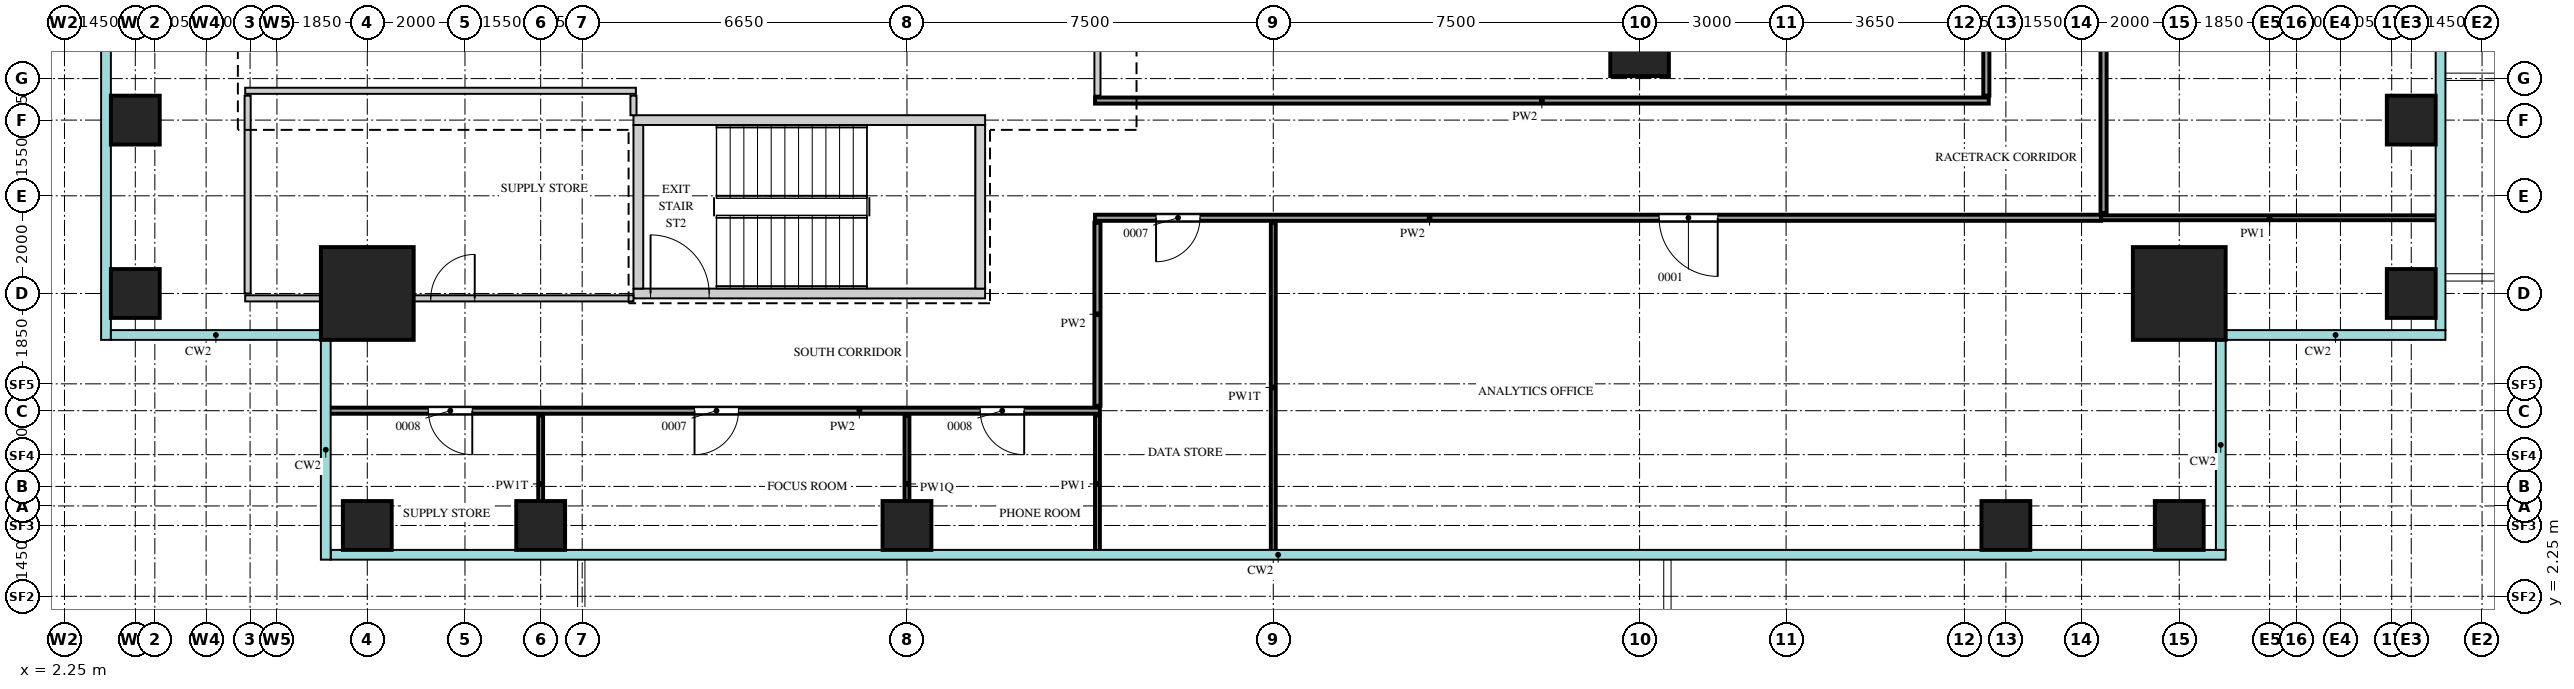
"""IFC4 building model, lengths in metres.
Left out: names, types, materials, properties, quantities, classifications, styles, units other than length and angle.
Written with IfcOpenShell. Run it as: python <this file> out.ifc"""

import sys

from ifc_helpers import new_model, si_unit, direction, frame, frame_2d, origin, origin_2d, place, context, subcontext, project, spatial, rectangle, extrude, source, transform, mapped, element, fill, save


model = new_model("IFC4")
c1 = context("Model", 3, precision=1e-05, world=origin(), true_north=direction((0.0, 1.0)))
c2 = subcontext(c1, "Body", "Model", "MODEL_VIEW")
j1 = project(units=[si_unit("LENGTHUNIT", "METRE"), si_unit("PLANEANGLEUNIT", "RADIAN")], contexts=[c1])
p1 = place(None, origin())
s1 = spatial("IfcSite", under=j1, at=p1, CompositionType="ELEMENT")
p2 = place(p1, origin())
s2 = spatial("IfcBuilding", under=s1, at=p2, CompositionType="ELEMENT")
p3 = place(p2, frame((0.0, 0.0, 208.7)))
s3 = spatial("IfcBuildingStorey", under=s2, at=p3, CompositionType="ELEMENT", Elevation=208.7)
m1 = source(origin(), c2, "Body", "SweptSolid", [
    extrude(rectangle(XDim=7.2, YDim=0.2, at=frame_2d((3.6, 0.0))), origin(), (0.0, 0.0, 1.0), 3.75),
])
p4 = place(p3, frame((13.9, 12.0, 0.0), z_axis=(0.0, 0.0, 1.0), x_axis=(1.0, 0.0, 0.0)))
e1 = element("IfcWall", 1, at=p4, inside=s3, PredefinedType="SHEAR", context=c2, shape_type="MappedRepresentation", body=[
    mapped(m1, transform((0.0, 0.0, 0.0))),
])
p5 = place(p3, frame((13.9, 8.45, 0.0), z_axis=(0.0, 0.0, 1.0), x_axis=(1.0, 0.0, 0.0)))
e2 = element("IfcWall", 2, at=p5, inside=s3, PredefinedType="SHEAR", context=c2, shape_type="MappedRepresentation", body=[
    mapped(m1, transform((0.0, 0.0, 0.0))),
])
m2 = source(origin(), c2, "Body", "SweptSolid", [
    extrude(rectangle(XDim=1.2, YDim=2.1, at=frame_2d((0.6, 1.05))), frame((0.0, 0.11, 0.0), z_axis=(0.0, -1.0, 0.0), x_axis=(1.0, 0.0, 0.0)), (0.0, 0.0, 1.0), 0.22),
])
p6 = place(p5, frame((0.35, 0.0, 0.0)))
e3 = element("IfcOpeningElement", 3, at=p6, cuts=e2, PredefinedType="OPENING", context=c2, shape_type="MappedRepresentation", body=[
    mapped(m2, transform((0.0, 0.0, 0.0))),
])
m3 = source(origin(), c2, "Body", "SweptSolid", [
    extrude(rectangle(XDim=3.35, YDim=0.2, at=frame_2d((1.675, 0.0))), origin(), (0.0, 0.0, 1.0), 3.75),
])
for number, where, z_axis, x_axis in (
    (4, (21.0, 8.55, 0.0), (0.0, 0.0, 1.0), (0.0, 1.0, 0.0)),
    (5, (14.0, 8.55, 0.0), (0.0, 0.0, 1.0), (0.0, 1.0, 0.0)),
):
    element("IfcWall", number, at=place(p3, frame(where, z_axis=z_axis, x_axis=x_axis)), inside=s3, PredefinedType="SHEAR", context=c2, shape_type="MappedRepresentation", body=[
        mapped(m3, transform((0.0, 0.0, 0.0))),
    ])
m4 = source(origin(), c2, "Body", "SweptSolid", [
    extrude(rectangle(XDim=1.9, YDim=1.9, at=origin_2d()), origin(), (0.0, 0.0, 1.0), 4.0),
])
for number, where, z_axis, x_axis in (
    (6, (45.55, 8.45, 0.0), (0.0, 0.0, 1.0), (1.0, 0.0, 0.0)),
    (7, (8.45, 8.45, 0.0), (0.0, 0.0, 1.0), (1.0, 0.0, 0.0)),
):
    element("IfcColumn", number, at=place(p3, frame(where, z_axis=z_axis, x_axis=x_axis)), inside=s3, PredefinedType="COLUMN", context=c2, shape_type="MappedRepresentation", body=[
        mapped(m4, transform((0.0, 0.0, 0.0))),
    ])
m5 = source(origin(), c2, "Body", "SweptSolid", [
    extrude(rectangle(XDim=1.0, YDim=1.0, at=origin_2d()), origin(), (0.0, 0.0, 1.0), 3.75),
])
for number, where, z_axis, x_axis in (
    (8, (8.45, 3.7, 0.0), (0.0, 0.0, 1.0), (1.0, 0.0, 0.0)),
    (9, (12.0, 3.7, 0.0), (0.0, 0.0, 1.0), (1.0, 0.0, 0.0)),
    (10, (19.5, 3.7, 0.0), (0.0, 0.0, 1.0), (1.0, 0.0, 0.0)),
    (11, (42.0, 3.7, 0.0), (0.0, 0.0, 1.0), (1.0, 0.0, 0.0)),
    (12, (45.55, 3.7, 0.0), (0.0, 0.0, 1.0), (1.0, 0.0, 0.0)),
    (13, (50.3, 8.45, 0.0), (0.0, 0.0, 1.0), (1.0, 0.0, 0.0)),
    (14, (50.3, 12.0, 0.0), (0.0, 0.0, 1.0), (1.0, 0.0, 0.0)),
    (15, (3.7, 8.45, 0.0), (0.0, 0.0, 1.0), (1.0, 0.0, 0.0)),
    (16, (3.7, 12.0, 0.0), (0.0, 0.0, 1.0), (1.0, 0.0, 0.0)),
):
    element("IfcColumn", number, at=place(p3, frame(where, z_axis=z_axis, x_axis=x_axis)), inside=s3, PredefinedType="COLUMN", context=c2, shape_type="MappedRepresentation", body=[
        mapped(m5, transform((0.0, 0.0, 0.0))),
    ])
m6 = source(origin(), c2, "Body", "SweptSolid", [
    extrude(rectangle(XDim=1.2, YDim=1.2, at=origin_2d()), origin(), (0.0, 0.0, 1.0), 3.75),
])
p7 = place(p3, frame((34.5, 13.5, 0.0), z_axis=(0.0, 0.0, 1.0), x_axis=(1.0, 0.0, 0.0)))
e17 = element("IfcColumn", 17, at=p7, inside=s3, PredefinedType="COLUMN", context=c2, shape_type="MappedRepresentation", body=[
    mapped(m6, transform((0.0, 0.0, 0.0))),
])
m7 = source(origin(), c2, "Body", "SweptSolid", [
    extrude(rectangle(XDim=2.8, YDim=0.1, at=frame_2d((1.4, 0.0))), origin(), (0.0, 0.0, 1.0), 3.3),
])
p8 = place(p3, frame((12.0, 3.15, 0.0), z_axis=(0.0, 0.0, 1.0), x_axis=(0.0, 1.0, 0.0)))
e18 = element("IfcWall", 18, at=p8, inside=s3, PredefinedType="PARTITIONING", context=c2, shape_type="MappedRepresentation", body=[
    mapped(m7, transform((0.0, 0.0, 0.0))),
])
m8 = source(origin(), c2, "Body", "SweptSolid", [
    extrude(rectangle(XDim=2.8, YDim=0.1, at=frame_2d((1.4, 0.0))), origin(), (0.0, 0.0, 1.0), 3.42),
])
p9 = place(p3, frame((19.5, 3.15, 0.0), z_axis=(0.0, 0.0, 1.0), x_axis=(0.0, 1.0, 0.0)))
e19 = element("IfcWall", 19, at=p9, inside=s3, PredefinedType="PARTITIONING", context=c2, shape_type="MappedRepresentation", body=[
    mapped(m8, transform((0.0, 0.0, 0.0))),
])
m9 = source(origin(), c2, "Body", "SweptSolid", [
    extrude(rectangle(XDim=2.8, YDim=0.1, at=frame_2d((1.4, 0.0))), origin(), (0.0, 0.0, 1.0), 3.8),
])
p10 = place(p3, frame((23.4, 3.15, 0.0), z_axis=(0.0, 0.0, 1.0), x_axis=(0.0, 1.0, 0.0)))
e20 = element("IfcWall", 20, at=p10, inside=s3, PredefinedType="PARTITIONING", context=c2, shape_type="MappedRepresentation", body=[
    mapped(m9, transform((0.0, 0.0, 0.0))),
])
m10 = source(origin(), c2, "Body", "SweptSolid", [
    extrude(rectangle(XDim=6.75, YDim=0.1, at=frame_2d((3.375, 0.0))), origin(), (0.0, 0.0, 1.0), 3.3),
])
p11 = place(p3, frame((27.0, 3.15, 0.0), z_axis=(0.0, 0.0, 1.0), x_axis=(0.0, 1.0, 0.0)))
e21 = element("IfcWall", 21, at=p11, inside=s3, PredefinedType="PARTITIONING", context=c2, shape_type="MappedRepresentation", body=[
    mapped(m10, transform((0.0, 0.0, 0.0))),
])
m11 = source(origin(), c2, "Body", "SweptSolid", [
    extrude(rectangle(XDim=15.8, YDim=0.125, at=frame_2d((7.9, 0.0))), origin(), (0.0, 0.0, 1.0), 3.8),
])
p12 = place(p3, frame((7.65, 6.05, 0.0), z_axis=(0.0, 0.0, 1.0), x_axis=(1.0, 0.0, 0.0)))
e22 = element("IfcWall", 22, at=p12, inside=s3, PredefinedType="PARTITIONING", context=c2, shape_type="MappedRepresentation", body=[
    mapped(m11, transform((0.0, 0.0, 0.0))),
])
m12 = source(origin(), c2, "Body", "SweptSolid", [
    extrude(rectangle(XDim=0.9, YDim=2.1, at=frame_2d((0.45, 1.05))), frame((0.0, 0.073, 0.0), z_axis=(0.0, -1.0, 0.0), x_axis=(1.0, 0.0, 0.0)), (0.0, 0.0, 1.0), 0.145),
])
p13 = place(p12, frame((2.05, 0.0, 0.0)))
e23 = element("IfcOpeningElement", 23, at=p13, cuts=e22, PredefinedType="OPENING", context=c2, shape_type="MappedRepresentation", body=[
    mapped(m12, transform((0.0, 0.0, 0.0))),
])
p14 = place(p12, frame((7.5, 0.0, 0.0)))
e24 = element("IfcOpeningElement", 24, at=p14, cuts=e22, PredefinedType="OPENING", context=c2, shape_type="MappedRepresentation", body=[
    mapped(m12, transform((0.0, 0.0, 0.0))),
])
p15 = place(p12, frame((13.35, 0.0, 0.0)))
e25 = element("IfcOpeningElement", 25, at=p15, cuts=e22, PredefinedType="OPENING", context=c2, shape_type="MappedRepresentation", body=[
    mapped(m12, transform((0.0, 0.0, 0.0))),
])
m13 = source(origin(), c2, "Body", "SweptSolid", [
    extrude(rectangle(XDim=3.75, YDim=0.125, at=frame_2d((1.875, 0.0))), origin(), (0.0, 0.0, 1.0), 3.8),
])
p16 = place(p3, frame((23.4, 6.15, 0.0), z_axis=(0.0, 0.0, 1.0), x_axis=(0.0, 1.0, 0.0)))
e26 = element("IfcWall", 26, at=p16, inside=s3, PredefinedType="PARTITIONING", context=c2, shape_type="MappedRepresentation", body=[
    mapped(m13, transform((0.0, 0.0, 0.0))),
])
m14 = source(origin(), c2, "Body", "SweptSolid", [
    extrude(rectangle(XDim=7.95, YDim=0.125, at=frame_2d((3.975, 0.0))), origin(), (0.0, 0.0, 1.0), 3.25),
])
p17 = place(p3, frame((5.95, 8.35, 0.0), z_axis=(0.0, 0.0, 1.0), x_axis=(1.0, 0.0, 0.0)))
e27 = element("IfcWall", 27, at=p17, inside=s3, PredefinedType="PARTITIONING", context=c2, shape_type="MappedRepresentation", body=[
    mapped(m14, transform((0.0, 0.0, 0.0))),
])
p18 = place(p17, frame((3.8, 0.0, 0.0)))
e28 = element("IfcOpeningElement", 28, at=p18, cuts=e27, PredefinedType="OPENING", context=c2, shape_type="MappedRepresentation", body=[
    mapped(m12, transform((0.0, 0.0, 0.0))),
])
m15 = source(origin(), c2, "Body", "SweptSolid", [
    extrude(rectangle(XDim=4.05, YDim=0.125, at=frame_2d((2.025, 0.0))), origin(), (0.0, 0.0, 1.0), 3.8),
])
p19 = place(p3, frame((6.0, 8.45, 0.0), z_axis=(0.0, 0.0, 1.0), x_axis=(0.0, 1.0, 0.0)))
e29 = element("IfcWall", 29, at=p19, inside=s3, PredefinedType="PARTITIONING", context=c2, shape_type="MappedRepresentation", body=[
    mapped(m15, transform((0.0, 0.0, 0.0))),
])
m16 = source(origin(), c2, "Body", "SweptSolid", [
    extrude(rectangle(XDim=20.6, YDim=0.125, at=frame_2d((10.3, 0.0))), origin(), (0.0, 0.0, 1.0), 3.8),
])
p20 = place(p3, frame((23.35, 10.0, 0.0), z_axis=(0.0, 0.0, 1.0), x_axis=(1.0, 0.0, 0.0)))
e30 = element("IfcWall", 30, at=p20, inside=s3, PredefinedType="PARTITIONING", context=c2, shape_type="MappedRepresentation", body=[
    mapped(m16, transform((0.0, 0.0, 0.0))),
])
p21 = place(p20, frame((1.25, 0.0, 0.0)))
e31 = element("IfcOpeningElement", 31, at=p21, cuts=e30, PredefinedType="OPENING", context=c2, shape_type="MappedRepresentation", body=[
    mapped(m12, transform((0.0, 0.0, 0.0))),
])
m17 = source(origin(), c2, "Body", "SweptSolid", [
    extrude(rectangle(XDim=1.2, YDim=2.1, at=frame_2d((0.6, 1.05))), frame((0.0, 0.073, 0.0), z_axis=(0.0, -1.0, 0.0), x_axis=(1.0, 0.0, 0.0)), (0.0, 0.0, 1.0), 0.145),
])
p22 = place(p20, frame((11.55, 0.0, 0.0)))
e32 = element("IfcOpeningElement", 32, at=p22, cuts=e30, PredefinedType="OPENING", context=c2, shape_type="MappedRepresentation", body=[
    mapped(m17, transform((0.0, 0.0, 0.0))),
])
m18 = source(origin(), c2, "Body", "SweptSolid", [
    extrude(rectangle(XDim=6.9, YDim=0.1, at=frame_2d((3.45, 0.0))), origin(), (0.0, 0.0, 1.0), 3.8),
])
p23 = place(p3, frame((43.95, 10.0, 0.0), z_axis=(0.0, 0.0, 1.0), x_axis=(1.0, 0.0, 0.0)))
e33 = element("IfcWall", 33, at=p23, inside=s3, PredefinedType="PARTITIONING", context=c2, shape_type="MappedRepresentation", body=[
    mapped(m18, transform((0.0, 0.0, 0.0))),
])
m19 = source(origin(), c2, "Body", "SweptSolid", [
    extrude(rectangle(XDim=33.8, YDim=0.125, at=frame_2d((16.9, 0.0))), origin(), (0.0, 0.0, 1.0), 3.8),
])
p24 = place(p3, frame((44.0, 10.1, 0.0), z_axis=(0.0, 0.0, 1.0), x_axis=(0.0, 1.0, 0.0)))
e34 = element("IfcWall", 34, at=p24, inside=s3, PredefinedType="PARTITIONING", context=c2, shape_type="MappedRepresentation", body=[
    mapped(m19, transform((0.0, 0.0, 0.0))),
])
p25 = place(p24, frame((12.75, 0.0, 0.0)))
e35 = element("IfcOpeningElement", 35, at=p25, cuts=e34, PredefinedType="OPENING", context=c2, shape_type="MappedRepresentation", body=[
    mapped(m17, transform((0.0, 0.0, 0.0))),
])
p26 = place(p24, frame((27.35, 0.0, 0.0)))
e36 = element("IfcOpeningElement", 36, at=p26, cuts=e34, PredefinedType="OPENING", context=c2, shape_type="MappedRepresentation", body=[
    mapped(m12, transform((0.0, 0.0, 0.0))),
])
m20 = source(origin(), c2, "Body", "SweptSolid", [
    extrude(rectangle(XDim=0.4, YDim=0.125, at=frame_2d((0.2, 0.0))), origin(), (0.0, 0.0, 1.0), 3.8),
])
p27 = place(p3, frame((13.9, 12.1, 0.0), z_axis=(0.0, 0.0, 1.0), x_axis=(0.0, 1.0, 0.0)))
e37 = element("IfcWall", 37, at=p27, inside=s3, PredefinedType="PARTITIONING", context=c2, shape_type="MappedRepresentation", body=[
    mapped(m20, transform((0.0, 0.0, 0.0))),
])
m21 = source(origin(), c2, "Body", "SweptSolid", [
    extrude(rectangle(XDim=18.3, YDim=0.125, at=frame_2d((9.15, 0.0))), origin(), (0.0, 0.0, 1.0), 3.8),
])
p28 = place(p3, frame((23.35, 12.4, 0.0), z_axis=(0.0, 0.0, 1.0), x_axis=(1.0, 0.0, 0.0)))
e38 = element("IfcWall", 38, at=p28, inside=s3, PredefinedType="PARTITIONING", context=c2, shape_type="MappedRepresentation", body=[
    mapped(m21, transform((0.0, 0.0, 0.0))),
])
m22 = source(origin(), c2, "Body", "SweptSolid", [
    extrude(rectangle(XDim=23.4, YDim=0.125, at=frame_2d((11.7, 0.0))), origin(), (0.0, 0.0, 1.0), 3.8),
])
p29 = place(p3, frame((23.4, 12.5, 0.0), z_axis=(0.0, 0.0, 1.0), x_axis=(0.0, 1.0, 0.0)))
e39 = element("IfcWall", 39, at=p29, inside=s3, PredefinedType="PARTITIONING", context=c2, shape_type="MappedRepresentation", body=[
    mapped(m22, transform((0.0, 0.0, 0.0))),
])
p30 = place(p29, frame((11.1, 0.0, 0.0)))
e40 = element("IfcOpeningElement", 40, at=p30, cuts=e39, PredefinedType="OPENING", context=c2, shape_type="MappedRepresentation", body=[
    mapped(m17, transform((0.0, 0.0, 0.0))),
])
m23 = source(origin(), c2, "Body", "SweptSolid", [
    extrude(rectangle(XDim=29.0, YDim=0.125, at=frame_2d((14.5, 0.0))), origin(), (0.0, 0.0, 1.0), 3.8),
])
p31 = place(p3, frame((41.6, 12.5, 0.0), z_axis=(0.0, 0.0, 1.0), x_axis=(0.0, 1.0, 0.0)))
e41 = element("IfcWall", 41, at=p31, inside=s3, PredefinedType="PARTITIONING", context=c2, shape_type="MappedRepresentation", body=[
    mapped(m23, transform((0.0, 0.0, 0.0))),
])
p32 = place(p31, frame((25.7, 0.0, 0.0)))
e42 = element("IfcOpeningElement", 42, at=p32, cuts=e41, PredefinedType="OPENING", context=c2, shape_type="MappedRepresentation", body=[
    mapped(m12, transform((0.0, 0.0, 0.0))),
])
m24 = source(origin(), c2, "Body", "SweptSolid", [
    extrude(rectangle(XDim=8.0, YDim=0.125, at=frame_2d((4.0, 0.0))), origin(), (0.0, 0.0, 1.0), 3.8),
])
p33 = place(p3, frame((5.95, 12.6, 0.0), z_axis=(0.0, 0.0, 1.0), x_axis=(1.0, 0.0, 0.0)))
e43 = element("IfcWall", 43, at=p33, inside=s3, PredefinedType="PARTITIONING", context=c2, shape_type="MappedRepresentation", body=[
    mapped(m24, transform((0.0, 0.0, 0.0))),
])
m25 = source(origin(), c2, "Body", "SweptSolid", [
    extrude(rectangle(XDim=0.9, YDim=2.1, at=frame_2d((0.45, 1.05))), frame((0.0, 0.025, 0.0), z_axis=(0.0, -1.0, 0.0), x_axis=(1.0, 0.0, 0.0)), (0.0, 0.0, 1.0), 0.05),
])
p34 = place(p21, origin())
e44 = element("IfcDoor", 44, at=p34, inside=s3, OperationType="SINGLE_SWING_LEFT", PredefinedType="DOOR", context=c2, shape_type="MappedRepresentation", body=[
    mapped(m25, transform((0.0, 0.0, 0.0))),
])
fill(e31, e44)
m26 = source(origin(), c2, "Body", "SweptSolid", [
    extrude(rectangle(XDim=1.2, YDim=2.1, at=frame_2d((0.6, 1.05))), frame((0.0, 0.025, 0.0), z_axis=(0.0, -1.0, 0.0), x_axis=(1.0, 0.0, 0.0)), (0.0, 0.0, 1.0), 0.05),
])
p35 = place(p22, origin())
e45 = element("IfcDoor", 45, at=p35, inside=s3, OperationType="SINGLE_SWING_RIGHT", PredefinedType="DOOR", context=c2, shape_type="MappedRepresentation", body=[
    mapped(m26, transform((0.0, 0.0, 0.0))),
])
fill(e32, e45)
p36 = place(p18, origin())
e46 = element("IfcDoor", 46, at=p36, inside=s3, OperationType="SINGLE_SWING_LEFT", PredefinedType="DOOR", context=c2, shape_type="MappedRepresentation", body=[
    mapped(m25, transform((0.0, 0.0, 0.0))),
])
fill(e28, e46)
p37 = place(p13, origin())
e47 = element("IfcDoor", 47, at=p37, inside=s3, OperationType="SINGLE_SWING_RIGHT", PredefinedType="DOOR", context=c2, shape_type="MappedRepresentation", body=[
    mapped(m25, transform((0.0, 0.0, 0.0))),
])
fill(e23, e47)
p38 = place(p14, origin())
e48 = element("IfcDoor", 48, at=p38, inside=s3, OperationType="SINGLE_SWING_LEFT", PredefinedType="DOOR", context=c2, shape_type="MappedRepresentation", body=[
    mapped(m25, transform((0.0, 0.0, 0.0))),
])
fill(e24, e48)
p39 = place(p15, origin())
e49 = element("IfcDoor", 49, at=p39, inside=s3, OperationType="SINGLE_SWING_RIGHT", PredefinedType="DOOR", context=c2, shape_type="MappedRepresentation", body=[
    mapped(m25, transform((0.0, 0.0, 0.0))),
])
fill(e25, e49)
p40 = place(p6, origin())
e50 = element("IfcDoor", 50, at=p40, inside=s3, OperationType="SINGLE_SWING_RIGHT", PredefinedType="DOOR", context=c2, shape_type="MappedRepresentation", body=[
    mapped(m26, transform((0.0, 0.0, 0.0))),
])
fill(e3, e50)
save(model, sys.argv[1])
